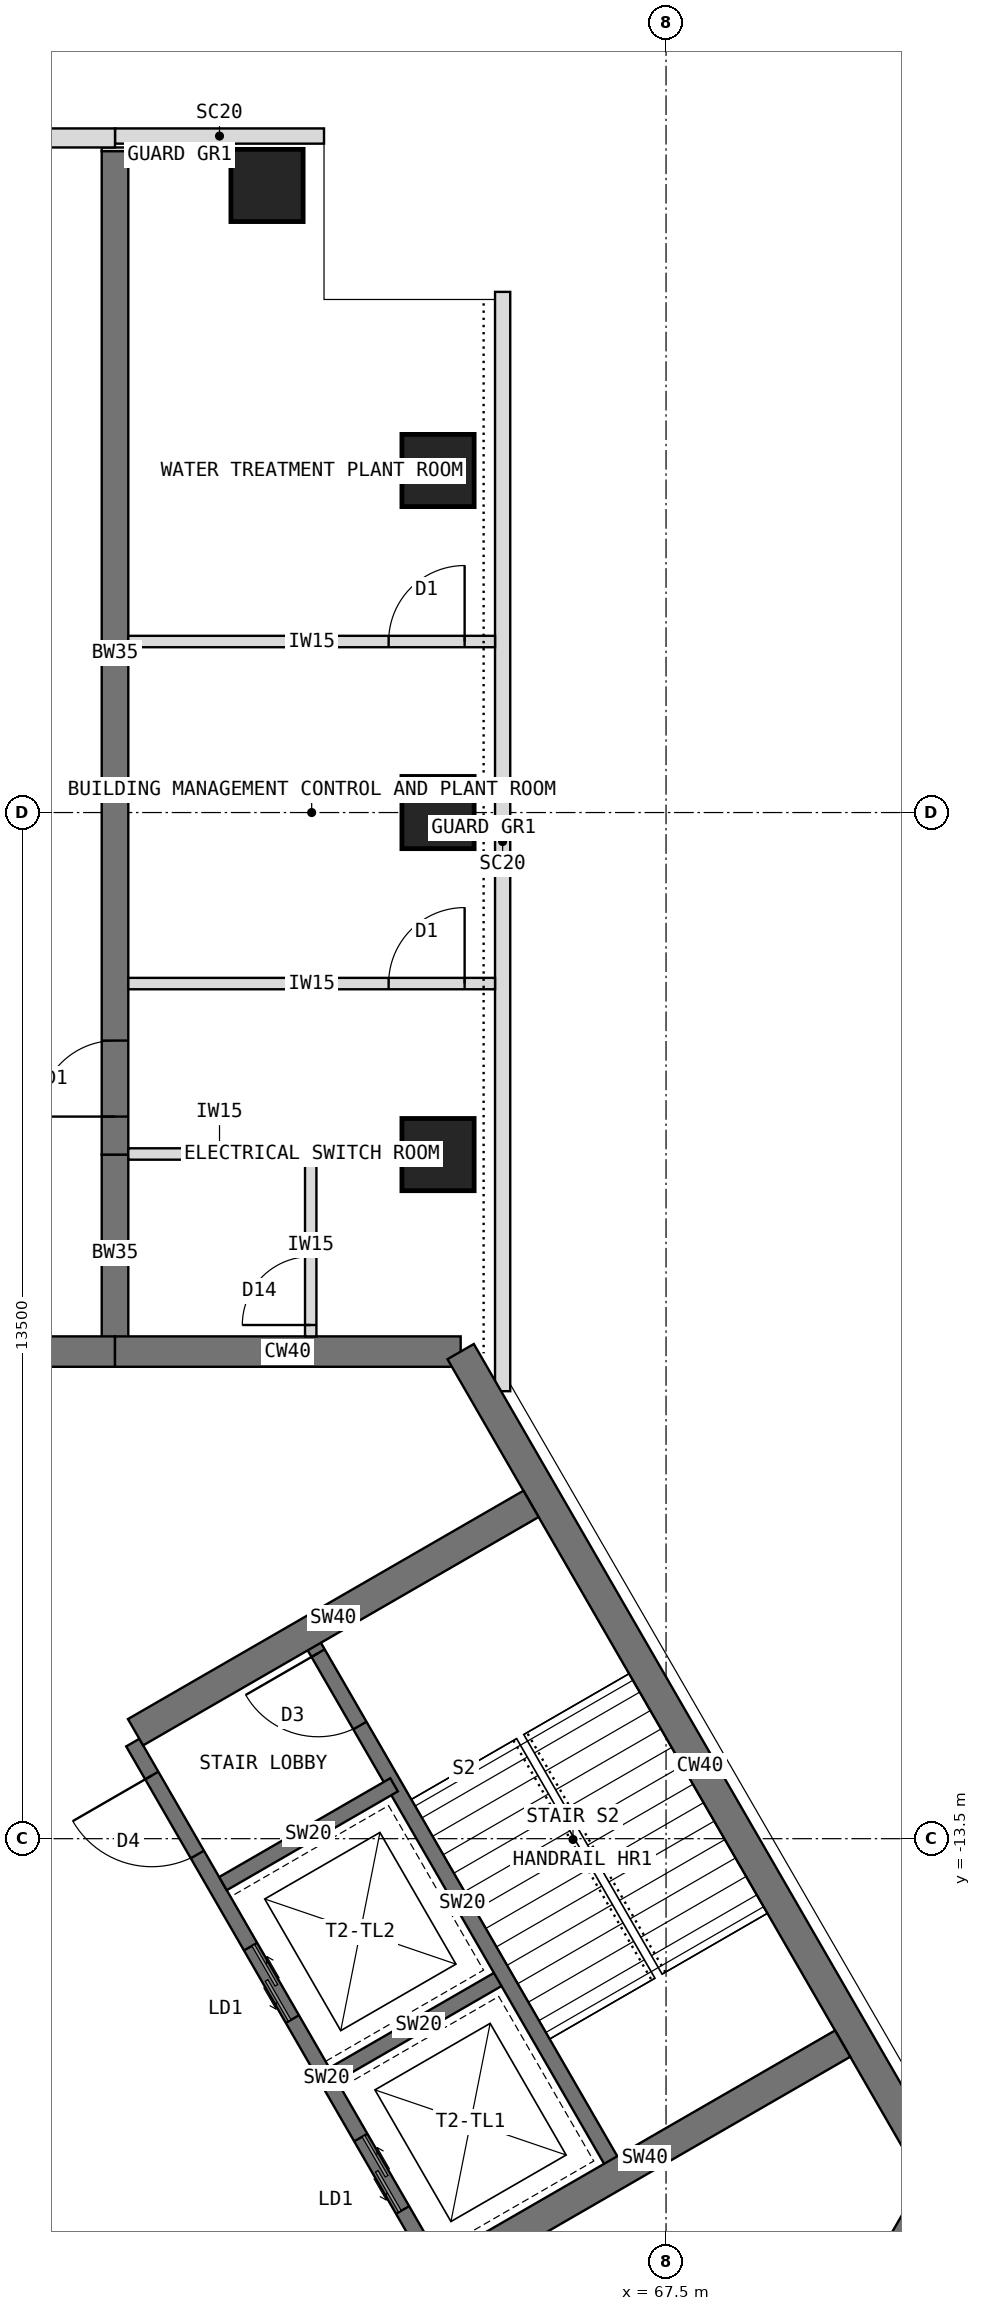
"""IFC4 building model, lengths in metres.
Left out: names, types, materials, properties, quantities, classifications, styles, units other than length and angle.
Written with IfcOpenShell. Run it as: python <this file> out.ifc"""

import sys

from ifc_helpers import new_model, si_unit, direction, frame, frame_2d, origin, origin_2d, place, context, subcontext, project, spatial, rectangle, extrude, element, fill, save


model = new_model("IFC4")
c1 = context("Model", 3, precision=1e-05, world=origin(), true_north=direction((0.0, 1.0)))
c2 = subcontext(c1, "Body", "Model", "MODEL_VIEW")
j1 = project(units=[si_unit("LENGTHUNIT", "METRE"), si_unit("PLANEANGLEUNIT", "RADIAN")], contexts=[c1])
p1 = place(None, origin())
s1 = spatial("IfcSite", under=j1, at=p1, CompositionType="ELEMENT")
p2 = place(p1, origin())
s2 = spatial("IfcBuilding", under=s1, at=p2, CompositionType="ELEMENT")
p3 = place(p2, frame((0.0, 0.0, 291.5)))
s3 = spatial("IfcBuildingStorey", under=s2, at=p3, CompositionType="ELEMENT", Elevation=291.5)
p4 = place(p3, frame((64.798, -7.092, 0.0), z_axis=(0.0, 0.0, 1.0), x_axis=(-1.0, 0.0, 0.0)))
e1 = element("IfcWall", 1, at=p4, inside=s3, PredefinedType="SHEAR", context=c2, shape_type="SweptSolid", body=[
    extrude(rectangle(XDim=4.548, YDim=0.4, at=frame_2d((2.274, 0.0))), origin(), (0.0, 0.0, 1.0), 4.55),
])
p5 = place(p3, frame((60.25, -7.092, 0.0), z_axis=(0.0, 0.0, 1.0), x_axis=(-1.0, 0.0, 0.0)))
e2 = element("IfcWall", 2, at=p5, inside=s3, PredefinedType="SHEAR", context=c2, shape_type="SweptSolid", body=[
    extrude(rectangle(XDim=3.5, YDim=0.4, at=frame_2d((1.75, 0.0))), origin(), (0.0, 0.0, 1.0), 4.55),
])
p6 = place(p5, frame((0.85, 0.0, 0.0)))
e3 = element("IfcOpeningElement", 3, at=p6, cuts=e2, PredefinedType="OPENING", context=c2, shape_type="SweptSolid", body=[
    extrude(rectangle(XDim=1.8, YDim=2.1, at=frame_2d((0.9, 1.05))), frame((0.0, 0.21, 0.0), z_axis=(0.0, -1.0, 0.0), x_axis=(1.0, 0.0, 0.0)), (0.0, 0.0, 1.0), 0.42),
])
p7 = place(p3, frame((68.822, -21.939, 0.0), z_axis=(0.0, 0.0, 1.0), x_axis=(0.500024481964, 0.866011268655, 0.0)))
e4 = element("IfcWall", 4, at=p7, inside=s3, PredefinedType="SHEAR", context=c2, shape_type="SweptSolid", body=[
    extrude(rectangle(XDim=4.548, YDim=0.4, at=frame_2d((2.274, 0.0))), origin(), (0.0, 0.0, 1.0), 4.55),
])
p8 = place(p3, frame((71.096, -18.0, 0.0), z_axis=(0.0, 0.0, 1.0), x_axis=(-0.500005998175, 0.866021940709, 0.0)))
e5 = element("IfcWall", 5, at=p8, inside=s3, PredefinedType="SHEAR", context=c2, shape_type="SweptSolid", body=[
    extrude(rectangle(XDim=12.596, YDim=0.4, at=frame_2d((6.298, 0.0))), origin(), (0.0, 0.0, 1.0), 4.55),
])
p9 = place(p3, frame((60.25, -7.092, 0.0), z_axis=(0.0, 0.0, 1.0), x_axis=(0.0, 1.0, 0.0)))
e6 = element("IfcWall", 6, at=p9, inside=s3, PredefinedType="SHEAR", context=c2, shape_type="SweptSolid", body=[
    extrude(rectangle(XDim=2.592, YDim=0.35, at=frame_2d((1.296, 0.0))), origin(), (0.0, 0.0, 1.0), 4.55),
])
p10 = place(p3, frame((60.25, -4.5, 0.0), z_axis=(0.0, 0.0, 1.0), x_axis=(0.0, 1.0, 0.0)))
e7 = element("IfcWall", 7, at=p10, inside=s3, PredefinedType="SHEAR", context=c2, shape_type="SweptSolid", body=[
    extrude(rectangle(XDim=13.2, YDim=0.35, at=frame_2d((6.6, 0.0))), origin(), (0.0, 0.0, 1.0), 4.55),
])
p11 = place(p10, frame((0.5, 0.0, 0.0)))
e8 = element("IfcOpeningElement", 8, at=p11, cuts=e7, PredefinedType="OPENING", context=c2, shape_type="SweptSolid", body=[
    extrude(rectangle(XDim=1.0, YDim=2.1, at=frame_2d((0.5, 1.05))), frame((0.0, 0.185, 0.0), z_axis=(0.0, -1.0, 0.0), x_axis=(1.0, 0.0, 0.0)), (0.0, 0.0, 1.0), 0.37),
])
for number, where, z_axis, x_axis in (
    (9, (64.5, -4.5, 0.0), (0.0, 0.0, 1.0), (1.0, 0.0, 0.0)),
    (10, (64.5, 0.0, 0.0), (0.0, 0.0, 1.0), (1.0, 0.0, 0.0)),
    (11, (64.5, 4.5, 0.0), (0.0, 0.0, 1.0), (1.0, 0.0, 0.0)),
    (12, (62.25, 8.25, 0.0), (0.0, 0.0, 1.0), (1.0, 0.0, 0.0)),
):
    element("IfcColumn", number, at=place(p3, frame(where, z_axis=z_axis, x_axis=x_axis)), inside=s3, PredefinedType="COLUMN", context=c2, shape_type="SweptSolid", body=[
        extrude(rectangle(XDim=0.95, YDim=0.95, at=origin_2d()), origin(), (0.0, 0.0, 1.0), 5.0),
    ])
p12 = place(p3, frame((65.35, 6.85, 0.0), z_axis=(0.0, 0.0, 1.0), x_axis=(0.0, -1.0, 0.0)))
e13 = element("IfcWall", 13, at=p12, inside=s3, PredefinedType="USERDEFINED", context=c2, shape_type="SweptSolid", body=[
    extrude(rectangle(XDim=14.463, YDim=0.2, at=frame_2d((7.231, 0.0))), origin(), (0.0, 0.0, 1.0), 4.55),
])
p13 = place(p3, frame((63.0, 8.9, 0.0), z_axis=(0.0, 0.0, 1.0), x_axis=(-1.0, 0.0, 0.0)))
e14 = element("IfcWall", 14, at=p13, inside=s3, PredefinedType="USERDEFINED", context=c2, shape_type="SweptSolid", body=[
    extrude(rectangle(XDim=2.75, YDim=0.2, at=frame_2d((1.375, 0.0))), origin(), (0.0, 0.0, 1.0), 4.55),
])
p14 = place(p3, frame((60.25, 8.875, 0.0), z_axis=(0.0, 0.0, 1.0), x_axis=(-1.0, 0.0, 0.0)))
e15 = element("IfcWall", 15, at=p14, inside=s3, PredefinedType="STANDARD", context=c2, shape_type="SweptSolid", body=[
    extrude(rectangle(XDim=3.5, YDim=0.25, at=frame_2d((1.75, 0.0))), origin(), (0.0, 0.0, 1.0), 4.55),
])
p15 = place(p3, frame((60.25, 8.7, 0.0), z_axis=(0.0, 0.0, 1.0), x_axis=(0.0, 1.0, 0.0)))
e16 = element("IfcWall", 16, at=p15, inside=s3, PredefinedType="PARTITIONING", context=c2, shape_type="SweptSolid", body=[
    extrude(rectangle(XDim=0.05, YDim=0.35, at=frame_2d((0.025, 0.0))), origin(), (0.0, 0.0, 1.0), 4.55),
])
p16 = place(p3, frame((64.484, -19.164, 0.0), z_axis=(0.0, 0.0, 1.0), x_axis=(-0.49999894854, 0.866026010844, 0.0)))
e17 = element("IfcWall", 17, at=p16, inside=s3, PredefinedType="SHEAR", context=c2, shape_type="SweptSolid", body=[
    extrude(rectangle(XDim=8.0, YDim=0.2, at=frame_2d((4.0, 0.0))), origin(), (0.0, 0.0, 1.0), 4.55),
])
p17 = place(p16, frame((6.3, 0.0, 0.0)))
e18 = element("IfcOpeningElement", 18, at=p17, cuts=e17, PredefinedType="OPENING", context=c2, shape_type="SweptSolid", body=[
    extrude(rectangle(XDim=1.2, YDim=2.1, at=frame_2d((0.6, 1.05))), frame((0.0, 0.11, 0.0), z_axis=(0.0, -1.0, 0.0), x_axis=(1.0, 0.0, 0.0)), (0.0, 0.0, 1.0), 0.22),
])
p18 = place(p16, frame((0.9, 0.0, 0.0)))
e19 = element("IfcOpeningElement", 19, at=p18, cuts=e17, PredefinedType="OPENING", context=c2, shape_type="SweptSolid", body=[
    extrude(rectangle(XDim=1.1, YDim=2.2, at=frame_2d((0.55, 1.1))), frame((0.0, 0.11, 0.0), z_axis=(0.0, -1.0, 0.0), x_axis=(1.0, 0.0, 0.0)), (0.0, 0.0, 1.0), 0.22),
])
p19 = place(p16, frame((3.8, 0.0, 0.0)))
e20 = element("IfcOpeningElement", 20, at=p19, cuts=e17, PredefinedType="OPENING", context=c2, shape_type="SweptSolid", body=[
    extrude(rectangle(XDim=1.1, YDim=2.2, at=frame_2d((0.55, 1.1))), frame((0.0, 0.11, 0.0), z_axis=(0.0, -1.0, 0.0), x_axis=(1.0, 0.0, 0.0)), (0.0, 0.0, 1.0), 0.22),
])
p20 = place(p3, frame((63.12, -16.603, 0.0), z_axis=(0.0, 0.0, 1.0), x_axis=(0.866062058628, 0.499936506574, 0.0)))
e21 = element("IfcWall", 21, at=p20, inside=s3, PredefinedType="SHEAR", context=c2, shape_type="SweptSolid", body=[
    extrude(rectangle(XDim=2.6, YDim=0.2, at=frame_2d((1.3, 0.0))), origin(), (0.0, 0.0, 1.0), 4.55),
])
p21 = place(p3, frame((61.67, -14.091, 0.0), z_axis=(0.0, 0.0, 1.0), x_axis=(0.86603858612, 0.49997716683, 0.0)))
e22 = element("IfcWall", 22, at=p21, inside=s3, PredefinedType="SHEAR", context=c2, shape_type="SweptSolid", body=[
    extrude(rectangle(XDim=2.6, YDim=0.2, at=frame_2d((1.3, 0.0))), origin(), (0.0, 0.0, 1.0), 4.55),
])
p22 = place(p3, frame((66.822, -17.814, 0.0), z_axis=(0.0, 0.0, 1.0), x_axis=(-0.49999894854, 0.866026010844, 0.0)))
e23 = element("IfcWall", 23, at=p22, inside=s3, PredefinedType="SHEAR", context=c2, shape_type="SweptSolid", body=[
    extrude(rectangle(XDim=8.0, YDim=0.2, at=frame_2d((4.0, 0.0))), origin(), (0.0, 0.0, 1.0), 4.55),
])
p23 = place(p22, frame((6.7, 0.0, 0.0)))
e24 = element("IfcOpeningElement", 24, at=p23, cuts=e23, PredefinedType="OPENING", context=c2, shape_type="SweptSolid", body=[
    extrude(rectangle(XDim=1.1, YDim=2.1, at=frame_2d((0.55, 1.05))), frame((0.0, 0.11, 0.0), z_axis=(0.0, -1.0, 0.0), x_axis=(1.0, 0.0, 0.0)), (0.0, 0.0, 1.0), 0.22),
])
for number, where, z_axis, x_axis in (
    (25, (60.52, -12.099, 0.0), (0.0, 0.0, 1.0), (0.866, 0.5, 0.0)),
    (26, (64.62, -19.201, 0.0), (0.0, 0.0, 1.0), (0.866, 0.5, 0.0)),
):
    element("IfcWall", number, at=place(p3, frame(where, z_axis=z_axis, x_axis=x_axis)), inside=s3, PredefinedType="SHEAR", context=c2, shape_type="SweptSolid", body=[
        extrude(rectangle(XDim=6.008, YDim=0.4, at=frame_2d((3.004, 0.0))), origin(), (0.0, 0.0, 1.0), 4.55),
    ])
p24 = place(p3, frame((60.425, -2.25, 0.0), z_axis=(0.0, 0.0, 1.0), x_axis=(1.0, 0.0, 0.0)))
e27 = element("IfcWall", 27, at=p24, inside=s3, PredefinedType="PARTITIONING", context=c2, shape_type="SweptSolid", body=[
    extrude(rectangle(XDim=4.825, YDim=0.15, at=frame_2d((2.413, 0.0))), origin(), (0.0, 0.0, 1.0), 4.55),
])
p25 = place(p24, frame((3.425, 0.0, 0.0)))
e28 = element("IfcOpeningElement", 28, at=p25, cuts=e27, PredefinedType="OPENING", context=c2, shape_type="SweptSolid", body=[
    extrude(rectangle(XDim=1.0, YDim=2.1, at=frame_2d((0.5, 1.05))), frame((0.0, 0.085, 0.0), z_axis=(0.0, -1.0, 0.0), x_axis=(1.0, 0.0, 0.0)), (0.0, 0.0, 1.0), 0.17),
])
p26 = place(p3, frame((60.425, 2.25, 0.0), z_axis=(0.0, 0.0, 1.0), x_axis=(1.0, 0.0, 0.0)))
e29 = element("IfcWall", 29, at=p26, inside=s3, PredefinedType="PARTITIONING", context=c2, shape_type="SweptSolid", body=[
    extrude(rectangle(XDim=4.825, YDim=0.15, at=frame_2d((2.413, 0.0))), origin(), (0.0, 0.0, 1.0), 4.55),
])
p27 = place(p26, frame((3.425, 0.0, 0.0)))
e30 = element("IfcOpeningElement", 30, at=p27, cuts=e29, PredefinedType="OPENING", context=c2, shape_type="SweptSolid", body=[
    extrude(rectangle(XDim=1.0, YDim=2.1, at=frame_2d((0.5, 1.05))), frame((0.0, 0.085, 0.0), z_axis=(0.0, -1.0, 0.0), x_axis=(1.0, 0.0, 0.0)), (0.0, 0.0, 1.0), 0.17),
])
p28 = place(p3, frame((62.825, -6.892, 0.0), z_axis=(0.0, 0.0, 1.0), x_axis=(0.0, 1.0, 0.0)))
e31 = element("IfcWall", 31, at=p28, inside=s3, PredefinedType="PARTITIONING", context=c2, shape_type="SweptSolid", body=[
    extrude(rectangle(XDim=2.4, YDim=0.15, at=frame_2d((1.2, 0.0))), origin(), (0.0, 0.0, 1.0), 4.55),
])
p29 = place(p28, frame((0.15, 0.0, 0.0)))
e32 = element("IfcOpeningElement", 32, at=p29, cuts=e31, PredefinedType="OPENING", context=c2, shape_type="SweptSolid", body=[
    extrude(rectangle(XDim=0.9, YDim=2.1, at=frame_2d((0.45, 1.05))), frame((0.0, 0.085, 0.0), z_axis=(0.0, -1.0, 0.0), x_axis=(1.0, 0.0, 0.0)), (0.0, 0.0, 1.0), 0.17),
])
p30 = place(p3, frame((60.425, -4.492, 0.0), z_axis=(0.0, 0.0, 1.0), x_axis=(1.0, 0.0, 0.0)))
e33 = element("IfcWall", 33, at=p30, inside=s3, PredefinedType="PARTITIONING", context=c2, shape_type="SweptSolid", body=[
    extrude(rectangle(XDim=2.4, YDim=0.15, at=frame_2d((1.2, 0.0))), origin(), (0.0, 0.0, 1.0), 4.017),
])
p31 = place(p17, origin())
e34 = element("IfcDoor", 34, at=p31, inside=s3, OperationType="SINGLE_SWING_RIGHT", PredefinedType="DOOR", context=c2, shape_type="SweptSolid", body=[
    extrude(rectangle(XDim=1.2, YDim=2.1, at=frame_2d((0.6, 1.05))), frame((0.0, 0.025, 0.0), z_axis=(0.0, -1.0, 0.0), x_axis=(1.0, 0.0, 0.0)), (0.0, 0.0, 1.0), 0.05),
])
fill(e18, e34)
p32 = place(p18, origin())
e35 = element("IfcDoor", 35, at=p32, inside=s3, OperationType="DOUBLE_DOOR_SLIDING", PredefinedType="DOOR", context=c2, shape_type="SweptSolid", body=[
    extrude(rectangle(XDim=1.1, YDim=2.2, at=frame_2d((0.55, 1.1))), frame((0.0, 0.025, 0.0), z_axis=(0.0, -1.0, 0.0), x_axis=(1.0, 0.0, 0.0)), (0.0, 0.0, 1.0), 0.05),
])
fill(e19, e35)
p33 = place(p19, origin())
e36 = element("IfcDoor", 36, at=p33, inside=s3, OperationType="DOUBLE_DOOR_SLIDING", PredefinedType="DOOR", context=c2, shape_type="SweptSolid", body=[
    extrude(rectangle(XDim=1.1, YDim=2.2, at=frame_2d((0.55, 1.1))), frame((0.0, 0.025, 0.0), z_axis=(0.0, -1.0, 0.0), x_axis=(1.0, 0.0, 0.0)), (0.0, 0.0, 1.0), 0.05),
])
fill(e20, e36)
p34 = place(p23, origin())
e37 = element("IfcDoor", 37, at=p34, inside=s3, OperationType="SINGLE_SWING_RIGHT", PredefinedType="DOOR", context=c2, shape_type="SweptSolid", body=[
    extrude(rectangle(XDim=1.1, YDim=2.1, at=frame_2d((0.55, 1.05))), frame((0.0, 0.025, 0.0), z_axis=(0.0, -1.0, 0.0), x_axis=(1.0, 0.0, 0.0)), (0.0, 0.0, 1.0), 0.05),
])
fill(e24, e37)
p35 = place(p25, origin())
e38 = element("IfcDoor", 38, at=p35, inside=s3, OperationType="SINGLE_SWING_RIGHT", PredefinedType="DOOR", context=c2, shape_type="SweptSolid", body=[
    extrude(rectangle(XDim=1.0, YDim=2.1, at=frame_2d((0.5, 1.05))), frame((0.0, 0.025, 0.0), z_axis=(0.0, -1.0, 0.0), x_axis=(1.0, 0.0, 0.0)), (0.0, 0.0, 1.0), 0.05),
])
fill(e28, e38)
p36 = place(p27, origin())
e39 = element("IfcDoor", 39, at=p36, inside=s3, OperationType="SINGLE_SWING_RIGHT", PredefinedType="DOOR", context=c2, shape_type="SweptSolid", body=[
    extrude(rectangle(XDim=1.0, YDim=2.1, at=frame_2d((0.5, 1.05))), frame((0.0, 0.025, 0.0), z_axis=(0.0, -1.0, 0.0), x_axis=(1.0, 0.0, 0.0)), (0.0, 0.0, 1.0), 0.05),
])
fill(e30, e39)
p37 = place(p29, origin())
e40 = element("IfcDoor", 40, at=p37, inside=s3, OperationType="SINGLE_SWING_LEFT", PredefinedType="DOOR", context=c2, shape_type="SweptSolid", body=[
    extrude(rectangle(XDim=0.9, YDim=2.1, at=frame_2d((0.45, 1.05))), frame((0.0, 0.025, 0.0), z_axis=(0.0, -1.0, 0.0), x_axis=(1.0, 0.0, 0.0)), (0.0, 0.0, 1.0), 0.05),
])
fill(e32, e40)
p38 = place(p11, origin())
e41 = element("IfcDoor", 41, at=p38, inside=s3, OperationType="SINGLE_SWING_LEFT", PredefinedType="DOOR", context=c2, shape_type="SweptSolid", body=[
    extrude(rectangle(XDim=1.0, YDim=2.1, at=frame_2d((0.5, 1.05))), frame((0.0, 0.025, 0.0), z_axis=(0.0, -1.0, 0.0), x_axis=(1.0, 0.0, 0.0)), (0.0, 0.0, 1.0), 0.05),
])
fill(e8, e41)
save(model, sys.argv[1])
